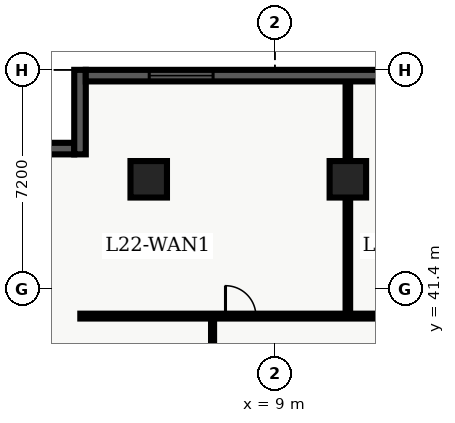
"""IFC4 building model, lengths in metres.
Left out: names, types, materials, properties, quantities, classifications, styles, units other than length and angle.
Written with IfcOpenShell. Run it as: python <this file> out.ifc"""

import sys

from ifc_helpers import new_model, entity, si_unit, converted_unit, direction, frame, origin_with_axes, origin_2d_with_axis, place, context, subcontext, project, spatial, polyline, rectangle, outline, extrude, element, fill, save


model = new_model("IFC4")
c1 = context("Model", 3, precision=1e-05, world=origin_with_axes(), true_north=direction((0.0, 1.0)))
c2 = subcontext(c1, "Body", "Model", "MODEL_VIEW")
j1 = project(units=[si_unit("LENGTHUNIT", "METRE"), converted_unit("PLANEANGLEUNIT", "DEGREE", entity("IfcPlaneAngleMeasure", 0.017), si_unit("PLANEANGLEUNIT", "RADIAN"), dimensions=[0, 0, 0, 0, 0, 0, 0])], contexts=[c1])
p1 = place(None, origin_with_axes())
s1 = spatial("IfcSite", under=j1, at=p1, CompositionType="ELEMENT")
p2 = place(p1, origin_with_axes())
s2 = spatial("IfcBuilding", under=s1, at=p2, CompositionType="ELEMENT")
p3 = place(p2, frame((0.0, 0.0, 93.0), z_axis=(0.0, 0.0, 1.0), x_axis=(1.0, 0.0, 0.0)))
s3 = spatial("IfcBuildingStorey", under=s2, at=p3, CompositionType="ELEMENT", Elevation=93.0)
for number, where, z_axis, x_axis in (
    (1, (11.4, 45.0, 0.0), (0.0, 0.0, 1.0), (1.0, 0.0, 0.0)),
    (2, (4.85, 45.0, 0.0), (0.0, 0.0, 1.0), (1.0, 0.0, 0.0)),
):
    element("IfcColumn", number, at=place(p3, frame(where, z_axis=z_axis, x_axis=x_axis)), inside=s3, PredefinedType="COLUMN", context=c2, shape_type="SweptSolid", body=[
        extrude(rectangle(XDim=1.2, YDim=1.2, at=origin_2d_with_axis()), origin_with_axes(), (0.0, 0.0, 1.0), 3.9),
    ])
p4 = place(p3, frame((2.6, 40.5, 0.0), z_axis=(0.0, 0.0, 1.0), x_axis=(1.0, 0.0, 0.0)))
e3 = element("IfcWall", 3, at=p4, inside=s3, PredefinedType="PARTITIONING", context=c2, shape_type="SweptSolid", body=[
    extrude(outline(polyline([(0.0, -0.08), (18.65, -0.08), (18.65, 0.08), (0.0, 0.08), (0.0, -0.08)])), origin_with_axes(), (0.0, 0.0, 1.0), 2.7),
])
p5 = place(p4, frame((5.275, 0.0, 0.0), z_axis=(0.0, 0.0, 1.0), x_axis=(1.0, 0.0, 0.0)))
e4 = element("IfcOpeningElement", 4, at=p5, cuts=e3, PredefinedType="OPENING", context=c2, shape_type="SweptSolid", body=[
    extrude(rectangle(XDim=1.0, YDim=0.18, at=origin_2d_with_axis()), origin_with_axes(), (0.0, 0.0, 1.0), 2.15),
])
p6 = place(p4, frame((12.61, 0.0, 0.0), z_axis=(0.0, 0.0, 1.0), x_axis=(1.0, 0.0, 0.0)))
e5 = element("IfcOpeningElement", 5, at=p6, cuts=e3, PredefinedType="OPENING", context=c2, shape_type="SweptSolid", body=[
    extrude(rectangle(XDim=1.2, YDim=0.18, at=origin_2d_with_axis()), origin_with_axes(), (0.0, 0.0, 1.0), 2.2),
])
p7 = place(p3, frame((6.95, 7.8, 0.0), z_axis=(0.0, 0.0, 1.0), x_axis=(0.0, 1.0, 0.0)))
e6 = element("IfcWall", 6, at=p7, inside=s3, PredefinedType="PARTITIONING", context=c2, shape_type="SweptSolid", body=[
    extrude(outline(polyline([(0.0, -0.05), (32.7, -0.05), (32.7, 0.05), (0.0, 0.05), (0.0, -0.05)])), origin_with_axes(), (0.0, 0.0, 1.0), 2.7),
])
p8 = place(p7, frame((2.967, 0.0, 0.0), z_axis=(0.0, 0.0, 1.0), x_axis=(1.0, 0.0, 0.0)))
e7 = element("IfcOpeningElement", 7, at=p8, cuts=e6, PredefinedType="OPENING", context=c2, shape_type="SweptSolid", body=[
    extrude(rectangle(XDim=1.0, YDim=0.12, at=origin_2d_with_axis()), origin_with_axes(), (0.0, 0.0, 1.0), 2.15),
])
p9 = place(p7, frame((9.279, 0.0, 0.0), z_axis=(0.0, 0.0, 1.0), x_axis=(1.0, 0.0, 0.0)))
e8 = element("IfcOpeningElement", 8, at=p9, cuts=e6, PredefinedType="OPENING", context=c2, shape_type="SweptSolid", body=[
    extrude(rectangle(XDim=1.0, YDim=0.12, at=origin_2d_with_axis()), origin_with_axes(), (0.0, 0.0, 1.0), 2.15),
])
p10 = place(p7, frame((17.202, 0.0, 0.0), z_axis=(0.0, 0.0, 1.0), x_axis=(1.0, 0.0, 0.0)))
e9 = element("IfcOpeningElement", 9, at=p10, cuts=e6, PredefinedType="OPENING", context=c2, shape_type="SweptSolid", body=[
    extrude(rectangle(XDim=1.0, YDim=0.12, at=origin_2d_with_axis()), origin_with_axes(), (0.0, 0.0, 1.0), 2.15),
])
p11 = place(p7, frame((27.11, 0.0, 0.0), z_axis=(0.0, 0.0, 1.0), x_axis=(1.0, 0.0, 0.0)))
e10 = element("IfcOpeningElement", 10, at=p11, cuts=e6, PredefinedType="OPENING", context=c2, shape_type="SweptSolid", body=[
    extrude(rectangle(XDim=1.0, YDim=0.12, at=origin_2d_with_axis()), origin_with_axes(), (0.0, 0.0, 1.0), 2.15),
])
p12 = place(p3, frame((11.4, 40.6, 0.0), z_axis=(0.0, 0.0, 1.0), x_axis=(0.0, 1.0, 0.0)))
e11 = element("IfcWall", 11, at=p12, inside=s3, PredefinedType="PARTITIONING", context=c2, shape_type="SweptSolid", body=[
    extrude(outline(polyline([(0.0, -0.075), (7.64, -0.075), (7.64, 0.075), (0.0, 0.075), (0.0, -0.075)])), origin_with_axes(), (0.0, 0.0, 1.0), 2.7),
])
p13 = place(p3, frame((0.38, 46.01, 0.0), z_axis=(0.0, 0.0, 1.0), x_axis=(1.0, 0.0, 0.0)))
e12 = element("IfcWall", 12, at=p13, inside=s3, PredefinedType="SOLIDWALL", context=c2, shape_type="SweptSolid", body=[
    extrude(outline(polyline([(0.0, -0.19), (2.02, -0.19), (2.02, 0.19), (0.0, 0.19), (0.0, -0.19)])), origin_with_axes(), (0.0, 0.0, 1.0), 3.66),
])
p14 = place(p3, frame((2.59, 45.82, 0.0), z_axis=(0.0, 0.0, 1.0), x_axis=(0.0, 1.0, 0.0)))
e13 = element("IfcWall", 13, at=p14, inside=s3, PredefinedType="SOLIDWALL", context=c2, shape_type="SweptSolid", body=[
    extrude(outline(polyline([(0.0, -0.19), (2.78, -0.19), (2.78, 0.19), (0.0, 0.19), (0.0, -0.19)])), origin_with_axes(), (0.0, 0.0, 1.0), 3.66),
])
p15 = place(p3, frame((2.78, 48.41, 0.0), z_axis=(0.0, 0.0, 1.0), x_axis=(1.0, 0.0, 0.0)))
e14 = element("IfcWall", 14, at=p15, inside=s3, PredefinedType="SOLIDWALL", context=c2, shape_type="SweptSolid", body=[
    extrude(outline(polyline([(0.0, -0.19), (16.42, -0.19), (16.42, 0.19), (0.0, 0.19), (0.0, -0.19)])), origin_with_axes(), (0.0, 0.0, 1.0), 3.66),
])
p16 = place(p15, frame((3.137, 0.0, 0.45), z_axis=(0.0, 0.0, 1.0), x_axis=(1.0, 0.0, 0.0)))
e15 = element("IfcOpeningElement", 15, at=p16, cuts=e14, PredefinedType="OPENING", context=c2, shape_type="SweptSolid", body=[
    extrude(rectangle(XDim=2.1, YDim=0.4, at=origin_2d_with_axis()), origin_with_axes(), (0.0, 0.0, 1.0), 2.2),
])
p17 = place(p15, frame((13.283, 0.0, 0.45), z_axis=(0.0, 0.0, 1.0), x_axis=(1.0, 0.0, 0.0)))
e16 = element("IfcOpeningElement", 16, at=p17, cuts=e14, PredefinedType="OPENING", context=c2, shape_type="SweptSolid", body=[
    extrude(rectangle(XDim=2.1, YDim=0.4, at=origin_2d_with_axis()), origin_with_axes(), (0.0, 0.0, 1.0), 2.2),
])
p18 = place(p4, frame((5.275, 0.0, 0.0), z_axis=(0.0, 0.0, 1.0), x_axis=(1.0, 0.0, 0.0)))
e17 = element("IfcDoor", 17, at=p18, inside=s3, OperationType="SINGLE_SWING_LEFT", PredefinedType="DOOR", context=c2, shape_type="SweptSolid", body=[
    extrude(rectangle(XDim=1.0, YDim=0.09, at=origin_2d_with_axis()), origin_with_axes(), (0.0, 0.0, 1.0), 2.15),
])
fill(e4, e17)
p19 = place(p15, frame((3.137, 0.0, 0.45), z_axis=(0.0, 0.0, 1.0), x_axis=(1.0, 0.0, 0.0)))
e18 = element("IfcWindow", 18, at=p19, inside=s3, PredefinedType="WINDOW", context=c2, shape_type="SweptSolid", body=[
    extrude(rectangle(XDim=2.1, YDim=0.09, at=origin_2d_with_axis()), origin_with_axes(), (0.0, 0.0, 1.0), 2.2),
])
fill(e15, e18)
save(model, sys.argv[1])
